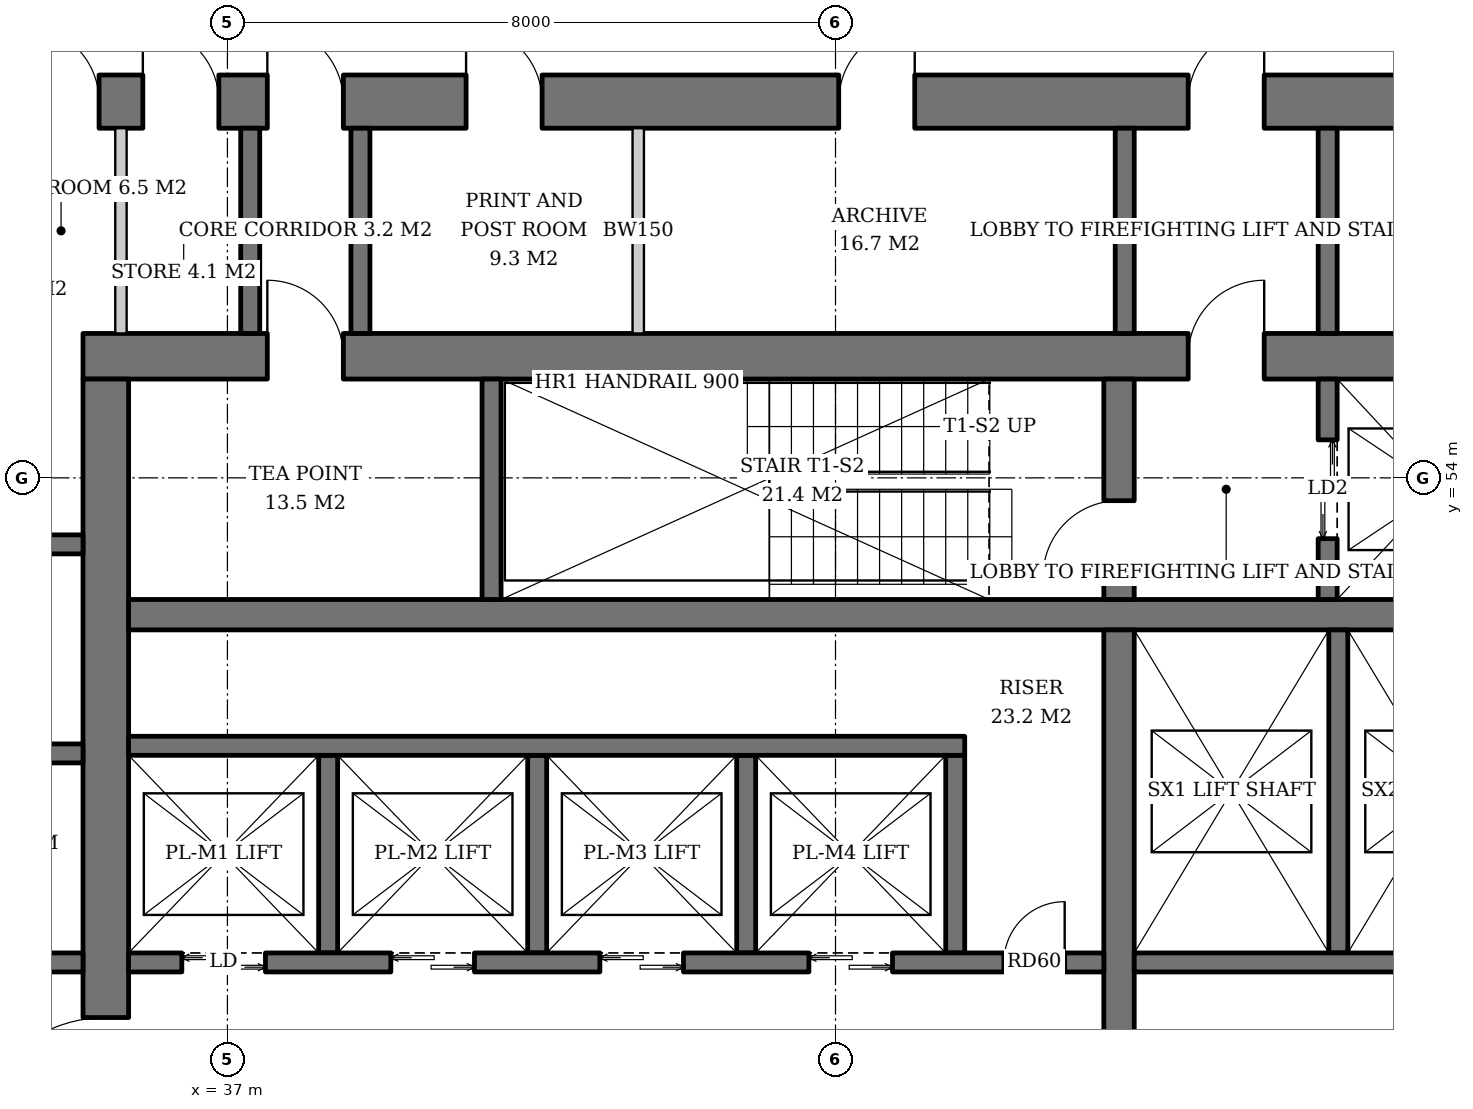
"""IFC4 building model, lengths in metres.
Left out: names, types, materials, properties, quantities, classifications, styles, units other than length and angle.
Written with IfcOpenShell. Run it as: python <this file> out.ifc"""

import sys

from ifc_helpers import new_model, si_unit, direction, frame, frame_2d, origin, place, context, subcontext, project, spatial, rectangle, extrude, element, fill, save


model = new_model("IFC4")
c1 = context("Model", 3, precision=1e-05, world=origin(), true_north=direction((0.0, 1.0)))
c2 = subcontext(c1, "Body", "Model", "MODEL_VIEW")
j1 = project(units=[si_unit("LENGTHUNIT", "METRE"), si_unit("PLANEANGLEUNIT", "RADIAN")], contexts=[c1])
p1 = place(None, origin())
s1 = spatial("IfcSite", under=j1, at=p1, CompositionType="ELEMENT")
p2 = place(p1, origin())
s2 = spatial("IfcBuilding", under=s1, at=p2, CompositionType="ELEMENT")
p3 = place(p2, frame((0.0, 0.0, 135.0)))
s3 = spatial("IfcBuildingStorey", under=s2, at=p3, CompositionType="ELEMENT", Elevation=135.0)
p4 = place(p3, frame((35.1, 55.6, 0.0), z_axis=(0.0, 0.0, 1.0), x_axis=(1.0, 0.0, 0.0)))
e1 = element("IfcWall", 1, at=p4, inside=s3, PredefinedType="SHEAR", context=c2, shape_type="SweptSolid", body=[
    extrude(rectangle(XDim=19.8, YDim=0.6, at=frame_2d((9.9, 0.0))), origin(), (0.0, 0.0, 1.0), 3.8),
])
p5 = place(p4, frame((14.54, 0.0, 0.0)))
e2 = element("IfcOpeningElement", 2, at=p5, cuts=e1, PredefinedType="OPENING", context=c2, shape_type="SweptSolid", body=[
    extrude(rectangle(XDim=1.0, YDim=2.1, at=frame_2d((0.5, 1.05))), frame((0.0, 0.31, 0.0), z_axis=(0.0, -1.0, 0.0), x_axis=(1.0, 0.0, 0.0)), (0.0, 0.0, 1.0), 0.62),
])
p6 = place(p4, frame((2.425, 0.0, 0.0)))
e3 = element("IfcOpeningElement", 3, at=p6, cuts=e1, PredefinedType="OPENING", context=c2, shape_type="SweptSolid", body=[
    extrude(rectangle(XDim=1.0, YDim=2.1, at=frame_2d((0.5, 1.05))), frame((0.0, 0.31, 0.0), z_axis=(0.0, -1.0, 0.0), x_axis=(1.0, 0.0, 0.0)), (0.0, 0.0, 1.0), 0.62),
])
p7 = place(p3, frame((35.4, 36.7, 0.0), z_axis=(0.0, 0.0, 1.0), x_axis=(0.0, 1.0, 0.0)))
e4 = element("IfcWall", 4, at=p7, inside=s3, PredefinedType="SHEAR", context=c2, shape_type="SweptSolid", body=[
    extrude(rectangle(XDim=18.6, YDim=0.6, at=frame_2d((9.3, 0.0))), origin(), (0.0, 0.0, 1.0), 3.8),
])
p8 = place(p7, frame((8.4, 0.0, 0.0)))
e5 = element("IfcOpeningElement", 5, at=p8, cuts=e4, PredefinedType="OPENING", context=c2, shape_type="SweptSolid", body=[
    extrude(rectangle(XDim=1.8, YDim=2.4, at=frame_2d((0.9, 1.2))), frame((0.0, 0.31, 0.0), z_axis=(0.0, -1.0, 0.0), x_axis=(1.0, 0.0, 0.0)), (0.0, 0.0, 1.0), 0.62),
])
p9 = place(p3, frame((31.7, 58.95, 0.0), z_axis=(0.0, 0.0, 1.0), x_axis=(1.0, 0.0, 0.0)))
e6 = element("IfcWall", 6, at=p9, inside=s3, PredefinedType="SHEAR", context=c2, shape_type="SweptSolid", body=[
    extrude(rectangle(XDim=26.6, YDim=0.7, at=frame_2d((13.3, 0.0))), origin(), (0.0, 0.0, 1.0), 3.8),
])
p10 = place(p9, frame((17.94, 0.0, 0.0)))
e7 = element("IfcOpeningElement", 7, at=p10, cuts=e6, PredefinedType="OPENING", context=c2, shape_type="SweptSolid", body=[
    extrude(rectangle(XDim=1.0, YDim=2.1, at=frame_2d((0.5, 1.05))), frame((0.0, 0.36, 0.0), z_axis=(0.0, -1.0, 0.0), x_axis=(1.0, 0.0, 0.0)), (0.0, 0.0, 1.0), 0.72),
])
p11 = place(p9, frame((5.825, 0.0, 0.0)))
e8 = element("IfcOpeningElement", 8, at=p11, cuts=e6, PredefinedType="OPENING", context=c2, shape_type="SweptSolid", body=[
    extrude(rectangle(XDim=1.0, YDim=2.1, at=frame_2d((0.5, 1.05))), frame((0.0, 0.36, 0.0), z_axis=(0.0, -1.0, 0.0), x_axis=(1.0, 0.0, 0.0)), (0.0, 0.0, 1.0), 0.72),
])
p12 = place(p9, frame((1.073, 0.0, 0.0)))
e9 = element("IfcOpeningElement", 9, at=p12, cuts=e6, PredefinedType="OPENING", context=c2, shape_type="SweptSolid", body=[
    extrude(rectangle(XDim=1.0, YDim=2.1, at=frame_2d((0.5, 1.05))), frame((0.0, 0.36, 0.0), z_axis=(0.0, -1.0, 0.0), x_axis=(1.0, 0.0, 0.0)), (0.0, 0.0, 1.0), 0.72),
])
p13 = place(p9, frame((2.611, 0.0, 0.0)))
e10 = element("IfcOpeningElement", 10, at=p13, cuts=e6, PredefinedType="OPENING", context=c2, shape_type="SweptSolid", body=[
    extrude(rectangle(XDim=1.0, YDim=2.1, at=frame_2d((0.5, 1.05))), frame((0.0, 0.36, 0.0), z_axis=(0.0, -1.0, 0.0), x_axis=(1.0, 0.0, 0.0)), (0.0, 0.0, 1.0), 0.72),
])
p14 = place(p9, frame((4.187, 0.0, 0.0)))
e11 = element("IfcOpeningElement", 11, at=p14, cuts=e6, PredefinedType="OPENING", context=c2, shape_type="SweptSolid", body=[
    extrude(rectangle(XDim=1.0, YDim=2.1, at=frame_2d((0.5, 1.05))), frame((0.0, 0.36, 0.0), z_axis=(0.0, -1.0, 0.0), x_axis=(1.0, 0.0, 0.0)), (0.0, 0.0, 1.0), 0.72),
])
p15 = place(p9, frame((8.44, 0.0, 0.0)))
e12 = element("IfcOpeningElement", 12, at=p15, cuts=e6, PredefinedType="OPENING", context=c2, shape_type="SweptSolid", body=[
    extrude(rectangle(XDim=1.0, YDim=2.1, at=frame_2d((0.5, 1.05))), frame((0.0, 0.36, 0.0), z_axis=(0.0, -1.0, 0.0), x_axis=(1.0, 0.0, 0.0)), (0.0, 0.0, 1.0), 0.72),
])
p16 = place(p9, frame((13.342, 0.0, 0.0)))
e13 = element("IfcOpeningElement", 13, at=p16, cuts=e6, PredefinedType="OPENING", context=c2, shape_type="SweptSolid", body=[
    extrude(rectangle(XDim=1.0, YDim=2.1, at=frame_2d((0.5, 1.05))), frame((0.0, 0.36, 0.0), z_axis=(0.0, -1.0, 0.0), x_axis=(1.0, 0.0, 0.0)), (0.0, 0.0, 1.0), 0.72),
])
p17 = place(p9, frame((22.4, 0.0, 0.0)))
e14 = element("IfcOpeningElement", 14, at=p17, cuts=e6, PredefinedType="OPENING", context=c2, shape_type="SweptSolid", body=[
    extrude(rectangle(XDim=1.0, YDim=2.1, at=frame_2d((0.5, 1.05))), frame((0.0, 0.36, 0.0), z_axis=(0.0, -1.0, 0.0), x_axis=(1.0, 0.0, 0.0)), (0.0, 0.0, 1.0), 0.72),
])
p18 = place(p3, frame((35.7, 52.2, 0.0), z_axis=(0.0, 0.0, 1.0), x_axis=(1.0, 0.0, 0.0)))
e15 = element("IfcWall", 15, at=p18, inside=s3, PredefinedType="SHEAR", context=c2, shape_type="SweptSolid", body=[
    extrude(rectangle(XDim=18.6, YDim=0.4, at=frame_2d((9.3, 0.0))), origin(), (0.0, 0.0, 1.0), 3.8),
])
p19 = place(p3, frame((48.73, 40.0, 0.0), z_axis=(0.0, 0.0, 1.0), x_axis=(0.0, 1.0, 0.0)))
e16 = element("IfcWall", 16, at=p19, inside=s3, PredefinedType="SHEAR", context=c2, shape_type="SweptSolid", body=[
    extrude(rectangle(XDim=12.0, YDim=0.4, at=frame_2d((6.0, 0.0))), origin(), (0.0, 0.0, 1.0), 3.8),
])
p20 = place(p3, frame((48.73, 52.4, 0.0), z_axis=(0.0, 0.0, 1.0), x_axis=(0.0, 1.0, 0.0)))
e17 = element("IfcWall", 17, at=p20, inside=s3, PredefinedType="SHEAR", context=c2, shape_type="SweptSolid", body=[
    extrude(rectangle(XDim=2.9, YDim=0.4, at=frame_2d((1.45, 0.0))), origin(), (0.0, 0.0, 1.0), 3.8),
])
p21 = place(p20, frame((0.3, 0.0, 0.0)))
e18 = element("IfcOpeningElement", 18, at=p21, cuts=e17, PredefinedType="OPENING", context=c2, shape_type="SweptSolid", body=[
    extrude(rectangle(XDim=1.0, YDim=2.1, at=frame_2d((0.5, 1.05))), frame((0.0, 0.21, 0.0), z_axis=(0.0, -1.0, 0.0), x_axis=(1.0, 0.0, 0.0)), (0.0, 0.0, 1.0), 0.42),
])
p22 = place(p3, frame((40.475, 52.4, 0.0), z_axis=(0.0, 0.0, 1.0), x_axis=(0.0, 1.0, 0.0)))
e19 = element("IfcWall", 19, at=p22, inside=s3, PredefinedType="SHEAR", context=c2, shape_type="SweptSolid", body=[
    extrude(rectangle(XDim=2.9, YDim=0.25, at=frame_2d((1.45, 0.0))), origin(), (0.0, 0.0, 1.0), 3.8),
])
p23 = place(p3, frame((51.475, 52.4, 0.0), z_axis=(0.0, 0.0, 1.0), x_axis=(0.0, 1.0, 0.0)))
e20 = element("IfcWall", 20, at=p23, inside=s3, PredefinedType="SHEAR", context=c2, shape_type="SweptSolid", body=[
    extrude(rectangle(XDim=2.9, YDim=0.25, at=frame_2d((1.45, 0.0))), origin(), (0.0, 0.0, 1.0), 3.8),
])
p24 = place(p23, frame((0.8, 0.0, 0.0)))
e21 = element("IfcOpeningElement", 21, at=p24, cuts=e20, PredefinedType="OPENING", context=c2, shape_type="SweptSolid", body=[
    extrude(rectangle(XDim=1.3, YDim=2.2, at=frame_2d((0.65, 1.1))), frame((0.0, 0.135, 0.0), z_axis=(0.0, -1.0, 0.0), x_axis=(1.0, 0.0, 0.0)), (0.0, 0.0, 1.0), 0.27),
])
for number, where, z_axis, x_axis in (
    (22, (38.325, 47.75, 0.0), (0.0, 0.0, 1.0), (0.0, 1.0, 0.0)),
    (23, (41.075, 47.75, 0.0), (0.0, 0.0, 1.0), (0.0, 1.0, 0.0)),
    (24, (43.825, 47.75, 0.0), (0.0, 0.0, 1.0), (0.0, 1.0, 0.0)),
    (25, (46.575, 47.75, 0.0), (0.0, 0.0, 1.0), (0.0, 1.0, 0.0)),
):
    element("IfcWall", number, at=place(p3, frame(where, z_axis=z_axis, x_axis=x_axis)), inside=s3, PredefinedType="SHEAR", context=c2, shape_type="SweptSolid", body=[
        extrude(rectangle(XDim=2.6, YDim=0.25, at=frame_2d((1.3, 0.0))), origin(), (0.0, 0.0, 1.0), 3.8),
    ])
p25 = place(p3, frame((35.7, 50.475, 0.0), z_axis=(0.0, 0.0, 1.0), x_axis=(1.0, 0.0, 0.0)))
e26 = element("IfcWall", 26, at=p25, inside=s3, PredefinedType="SHEAR", context=c2, shape_type="SweptSolid", body=[
    extrude(rectangle(XDim=11.0, YDim=0.25, at=frame_2d((5.5, 0.0))), origin(), (0.0, 0.0, 1.0), 3.8),
])
p26 = place(p3, frame((35.7, 47.625, 0.0), z_axis=(0.0, 0.0, 1.0), x_axis=(1.0, 0.0, 0.0)))
e27 = element("IfcWall", 27, at=p26, inside=s3, PredefinedType="SHEAR", context=c2, shape_type="SweptSolid", body=[
    extrude(rectangle(XDim=12.83, YDim=0.25, at=frame_2d((6.415, 0.0))), origin(), (0.0, 0.0, 1.0), 3.8),
])
p27 = place(p26, frame((0.7, 0.0, 0.0)))
e28 = element("IfcOpeningElement", 28, at=p27, cuts=e27, PredefinedType="OPENING", context=c2, shape_type="SweptSolid", body=[
    extrude(rectangle(XDim=1.1, YDim=2.2, at=frame_2d((0.55, 1.1))), frame((0.0, 0.135, 0.0), z_axis=(0.0, -1.0, 0.0), x_axis=(1.0, 0.0, 0.0)), (0.0, 0.0, 1.0), 0.27),
])
p28 = place(p26, frame((3.45, 0.0, 0.0)))
e29 = element("IfcOpeningElement", 29, at=p28, cuts=e27, PredefinedType="OPENING", context=c2, shape_type="SweptSolid", body=[
    extrude(rectangle(XDim=1.1, YDim=2.2, at=frame_2d((0.55, 1.1))), frame((0.0, 0.135, 0.0), z_axis=(0.0, -1.0, 0.0), x_axis=(1.0, 0.0, 0.0)), (0.0, 0.0, 1.0), 0.27),
])
p29 = place(p26, frame((6.2, 0.0, 0.0)))
e30 = element("IfcOpeningElement", 30, at=p29, cuts=e27, PredefinedType="OPENING", context=c2, shape_type="SweptSolid", body=[
    extrude(rectangle(XDim=1.1, YDim=2.2, at=frame_2d((0.55, 1.1))), frame((0.0, 0.135, 0.0), z_axis=(0.0, -1.0, 0.0), x_axis=(1.0, 0.0, 0.0)), (0.0, 0.0, 1.0), 0.27),
])
p30 = place(p26, frame((8.95, 0.0, 0.0)))
e31 = element("IfcOpeningElement", 31, at=p30, cuts=e27, PredefinedType="OPENING", context=c2, shape_type="SweptSolid", body=[
    extrude(rectangle(XDim=1.1, YDim=2.2, at=frame_2d((0.55, 1.1))), frame((0.0, 0.135, 0.0), z_axis=(0.0, -1.0, 0.0), x_axis=(1.0, 0.0, 0.0)), (0.0, 0.0, 1.0), 0.27),
])
p31 = place(p26, frame((11.515, 0.0, 0.0)))
e32 = element("IfcOpeningElement", 32, at=p31, cuts=e27, PredefinedType="OPENING", context=c2, shape_type="SweptSolid", body=[
    extrude(rectangle(XDim=0.8, YDim=2.0, at=frame_2d((0.4, 1.0))), frame((0.0, 0.135, 0.0), z_axis=(0.0, -1.0, 0.0), x_axis=(1.0, 0.0, 0.0)), (0.0, 0.0, 1.0), 0.27),
])
p32 = place(p3, frame((51.615, 47.75, 0.0), z_axis=(0.0, 0.0, 1.0), x_axis=(0.0, 1.0, 0.0)))
e33 = element("IfcWall", 33, at=p32, inside=s3, PredefinedType="SHEAR", context=c2, shape_type="SweptSolid", body=[
    extrude(rectangle(XDim=4.25, YDim=0.25, at=frame_2d((2.125, 0.0))), origin(), (0.0, 0.0, 1.0), 3.8),
])
p33 = place(p3, frame((48.93, 47.625, 0.0), z_axis=(0.0, 0.0, 1.0), x_axis=(1.0, 0.0, 0.0)))
e34 = element("IfcWall", 34, at=p33, inside=s3, PredefinedType="SHEAR", context=c2, shape_type="SweptSolid", body=[
    extrude(rectangle(XDim=5.37, YDim=0.25, at=frame_2d((2.685, 0.0))), origin(), (0.0, 0.0, 1.0), 3.8),
])
for number, where, z_axis, x_axis in (
    (35, (32.4, 47.625, 0.0), (0.0, 0.0, 1.0), (1.0, 0.0, 0.0)),
    (36, (32.4, 50.375, 0.0), (0.0, 0.0, 1.0), (1.0, 0.0, 0.0)),
    (37, (32.4, 53.125, 0.0), (0.0, 0.0, 1.0), (1.0, 0.0, 0.0)),
):
    element("IfcWall", number, at=place(p3, frame(where, z_axis=z_axis, x_axis=x_axis)), inside=s3, PredefinedType="SHEAR", context=c2, shape_type="SweptSolid", body=[
        extrude(rectangle(XDim=2.7, YDim=0.25, at=frame_2d((1.35, 0.0))), origin(), (0.0, 0.0, 1.0), 3.8),
    ])
for number, where, z_axis, x_axis in (
    (38, (48.805, 55.9, 0.0), (0.0, 0.0, 1.0), (0.0, 1.0, 0.0)),
    (39, (51.475, 55.9, 0.0), (0.0, 0.0, 1.0), (0.0, 1.0, 0.0)),
    (40, (37.3, 55.9, 0.0), (0.0, 0.0, 1.0), (0.0, 1.0, 0.0)),
    (41, (38.75, 55.9, 0.0), (0.0, 0.0, 1.0), (0.0, 1.0, 0.0)),
):
    element("IfcWall", number, at=place(p3, frame(where, z_axis=z_axis, x_axis=x_axis)), inside=s3, PredefinedType="SOLIDWALL", context=c2, shape_type="SweptSolid", body=[
        extrude(rectangle(XDim=2.7, YDim=0.25, at=frame_2d((1.35, 0.0))), origin(), (0.0, 0.0, 1.0), 3.62),
    ])
for number, where, z_axis, x_axis in (
    (42, (35.599, 55.9, 0.0), (0.0, 0.0, 1.0), (0.0, 1.0, 0.0)),
    (43, (42.405, 55.9, 0.0), (0.0, 0.0, 1.0), (0.0, 1.0, 0.0)),
):
    element("IfcWall", number, at=place(p3, frame(where, z_axis=z_axis, x_axis=x_axis)), inside=s3, PredefinedType="SOLIDWALL", context=c2, shape_type="SweptSolid", body=[
        extrude(rectangle(XDim=2.7, YDim=0.15, at=frame_2d((1.35, 0.0))), origin(), (0.0, 0.0, 1.0), 3.62),
    ])
p34 = place(p24, origin())
e44 = element("IfcDoor", 44, at=p34, inside=s3, OperationType="DOUBLE_DOOR_SLIDING", PredefinedType="DOOR", context=c2, shape_type="SweptSolid", body=[
    extrude(rectangle(XDim=1.3, YDim=2.2, at=frame_2d((0.65, 1.1))), frame((0.0, 0.025, 0.0), z_axis=(0.0, -1.0, 0.0), x_axis=(1.0, 0.0, 0.0)), (0.0, 0.0, 1.0), 0.05),
])
fill(e21, e44)
p35 = place(p27, origin())
e45 = element("IfcDoor", 45, at=p35, inside=s3, OperationType="DOUBLE_DOOR_SLIDING", PredefinedType="DOOR", context=c2, shape_type="SweptSolid", body=[
    extrude(rectangle(XDim=1.1, YDim=2.2, at=frame_2d((0.55, 1.1))), frame((0.0, 0.025, 0.0), z_axis=(0.0, -1.0, 0.0), x_axis=(1.0, 0.0, 0.0)), (0.0, 0.0, 1.0), 0.05),
])
fill(e28, e45)
p36 = place(p28, origin())
e46 = element("IfcDoor", 46, at=p36, inside=s3, OperationType="DOUBLE_DOOR_SLIDING", PredefinedType="DOOR", context=c2, shape_type="SweptSolid", body=[
    extrude(rectangle(XDim=1.1, YDim=2.2, at=frame_2d((0.55, 1.1))), frame((0.0, 0.025, 0.0), z_axis=(0.0, -1.0, 0.0), x_axis=(1.0, 0.0, 0.0)), (0.0, 0.0, 1.0), 0.05),
])
fill(e29, e46)
p37 = place(p29, origin())
e47 = element("IfcDoor", 47, at=p37, inside=s3, OperationType="DOUBLE_DOOR_SLIDING", PredefinedType="DOOR", context=c2, shape_type="SweptSolid", body=[
    extrude(rectangle(XDim=1.1, YDim=2.2, at=frame_2d((0.55, 1.1))), frame((0.0, 0.025, 0.0), z_axis=(0.0, -1.0, 0.0), x_axis=(1.0, 0.0, 0.0)), (0.0, 0.0, 1.0), 0.05),
])
fill(e30, e47)
p38 = place(p30, origin())
e48 = element("IfcDoor", 48, at=p38, inside=s3, OperationType="DOUBLE_DOOR_SLIDING", PredefinedType="DOOR", context=c2, shape_type="SweptSolid", body=[
    extrude(rectangle(XDim=1.1, YDim=2.2, at=frame_2d((0.55, 1.1))), frame((0.0, 0.025, 0.0), z_axis=(0.0, -1.0, 0.0), x_axis=(1.0, 0.0, 0.0)), (0.0, 0.0, 1.0), 0.05),
])
fill(e31, e48)
p39 = place(p31, origin())
e49 = element("IfcDoor", 49, at=p39, inside=s3, OperationType="SINGLE_SWING_RIGHT", PredefinedType="DOOR", context=c2, shape_type="SweptSolid", body=[
    extrude(rectangle(XDim=0.8, YDim=2.0, at=frame_2d((0.4, 1.0))), frame((0.0, 0.025, 0.0), z_axis=(0.0, -1.0, 0.0), x_axis=(1.0, 0.0, 0.0)), (0.0, 0.0, 1.0), 0.05),
])
fill(e32, e49)
p40 = place(p21, origin())
e50 = element("IfcDoor", 50, at=p40, inside=s3, OperationType="SINGLE_SWING_LEFT", PredefinedType="DOOR", context=c2, shape_type="SweptSolid", body=[
    extrude(rectangle(XDim=1.0, YDim=2.1, at=frame_2d((0.5, 1.05))), frame((0.0, 0.025, 0.0), z_axis=(0.0, -1.0, 0.0), x_axis=(1.0, 0.0, 0.0)), (0.0, 0.0, 1.0), 0.05),
])
fill(e18, e50)
p41 = place(p5, origin())
e51 = element("IfcDoor", 51, at=p41, inside=s3, OperationType="SINGLE_SWING_RIGHT", PredefinedType="DOOR", context=c2, shape_type="SweptSolid", body=[
    extrude(rectangle(XDim=1.0, YDim=2.1, at=frame_2d((0.5, 1.05))), frame((0.0, 0.025, 0.0), z_axis=(0.0, -1.0, 0.0), x_axis=(1.0, 0.0, 0.0)), (0.0, 0.0, 1.0), 0.05),
])
fill(e2, e51)
p42 = place(p8, origin())
e52 = element("IfcDoor", 52, at=p42, inside=s3, OperationType="DOUBLE_DOOR_SINGLE_SWING", PredefinedType="DOOR", context=c2, shape_type="SweptSolid", body=[
    extrude(rectangle(XDim=1.8, YDim=2.4, at=frame_2d((0.9, 1.2))), frame((0.0, 0.025, 0.0), z_axis=(0.0, -1.0, 0.0), x_axis=(1.0, 0.0, 0.0)), (0.0, 0.0, 1.0), 0.05),
])
fill(e5, e52)
p43 = place(p10, origin())
e53 = element("IfcDoor", 53, at=p43, inside=s3, OperationType="SINGLE_SWING_RIGHT", PredefinedType="DOOR", context=c2, shape_type="SweptSolid", body=[
    extrude(rectangle(XDim=1.0, YDim=2.1, at=frame_2d((0.5, 1.05))), frame((0.0, 0.025, 0.0), z_axis=(0.0, -1.0, 0.0), x_axis=(1.0, 0.0, 0.0)), (0.0, 0.0, 1.0), 0.05),
])
fill(e7, e53)
p44 = place(p11, origin())
e54 = element("IfcDoor", 54, at=p44, inside=s3, OperationType="SINGLE_SWING_LEFT", PredefinedType="DOOR", context=c2, shape_type="SweptSolid", body=[
    extrude(rectangle(XDim=1.0, YDim=2.1, at=frame_2d((0.5, 1.05))), frame((0.0, 0.025, 0.0), z_axis=(0.0, -1.0, 0.0), x_axis=(1.0, 0.0, 0.0)), (0.0, 0.0, 1.0), 0.05),
])
fill(e8, e54)
p45 = place(p6, origin())
e55 = element("IfcDoor", 55, at=p45, inside=s3, OperationType="SINGLE_SWING_LEFT", PredefinedType="DOOR", context=c2, shape_type="SweptSolid", body=[
    extrude(rectangle(XDim=1.0, YDim=2.1, at=frame_2d((0.5, 1.05))), frame((0.0, -0.24, 0.0), z_axis=(0.0, -1.0, 0.0), x_axis=(1.0, 0.0, 0.0)), (0.0, 0.0, 1.0), 0.05),
])
fill(e3, e55)
p46 = place(p13, origin())
e56 = element("IfcDoor", 56, at=p46, inside=s3, OperationType="SINGLE_SWING_LEFT", PredefinedType="DOOR", context=c2, shape_type="SweptSolid", body=[
    extrude(rectangle(XDim=1.0, YDim=2.1, at=frame_2d((0.5, 1.05))), frame((0.0, -0.29, 0.0), z_axis=(0.0, -1.0, 0.0), x_axis=(1.0, 0.0, 0.0)), (0.0, 0.0, 1.0), 0.05),
])
fill(e10, e56)
p47 = place(p14, origin())
e57 = element("IfcDoor", 57, at=p47, inside=s3, OperationType="SINGLE_SWING_LEFT", PredefinedType="DOOR", context=c2, shape_type="SweptSolid", body=[
    extrude(rectangle(XDim=1.0, YDim=2.1, at=frame_2d((0.5, 1.05))), frame((0.0, -0.29, 0.0), z_axis=(0.0, -1.0, 0.0), x_axis=(1.0, 0.0, 0.0)), (0.0, 0.0, 1.0), 0.05),
])
fill(e11, e57)
p48 = place(p15, origin())
e58 = element("IfcDoor", 58, at=p48, inside=s3, OperationType="SINGLE_SWING_LEFT", PredefinedType="DOOR", context=c2, shape_type="SweptSolid", body=[
    extrude(rectangle(XDim=1.0, YDim=2.1, at=frame_2d((0.5, 1.05))), frame((0.0, -0.29, 0.0), z_axis=(0.0, -1.0, 0.0), x_axis=(1.0, 0.0, 0.0)), (0.0, 0.0, 1.0), 0.05),
])
fill(e12, e58)
p49 = place(p16, origin())
e59 = element("IfcDoor", 59, at=p49, inside=s3, OperationType="SINGLE_SWING_RIGHT", PredefinedType="DOOR", context=c2, shape_type="SweptSolid", body=[
    extrude(rectangle(XDim=1.0, YDim=2.1, at=frame_2d((0.5, 1.05))), frame((0.0, -0.29, 0.0), z_axis=(0.0, -1.0, 0.0), x_axis=(1.0, 0.0, 0.0)), (0.0, 0.0, 1.0), 0.05),
])
fill(e13, e59)
save(model, sys.argv[1])
